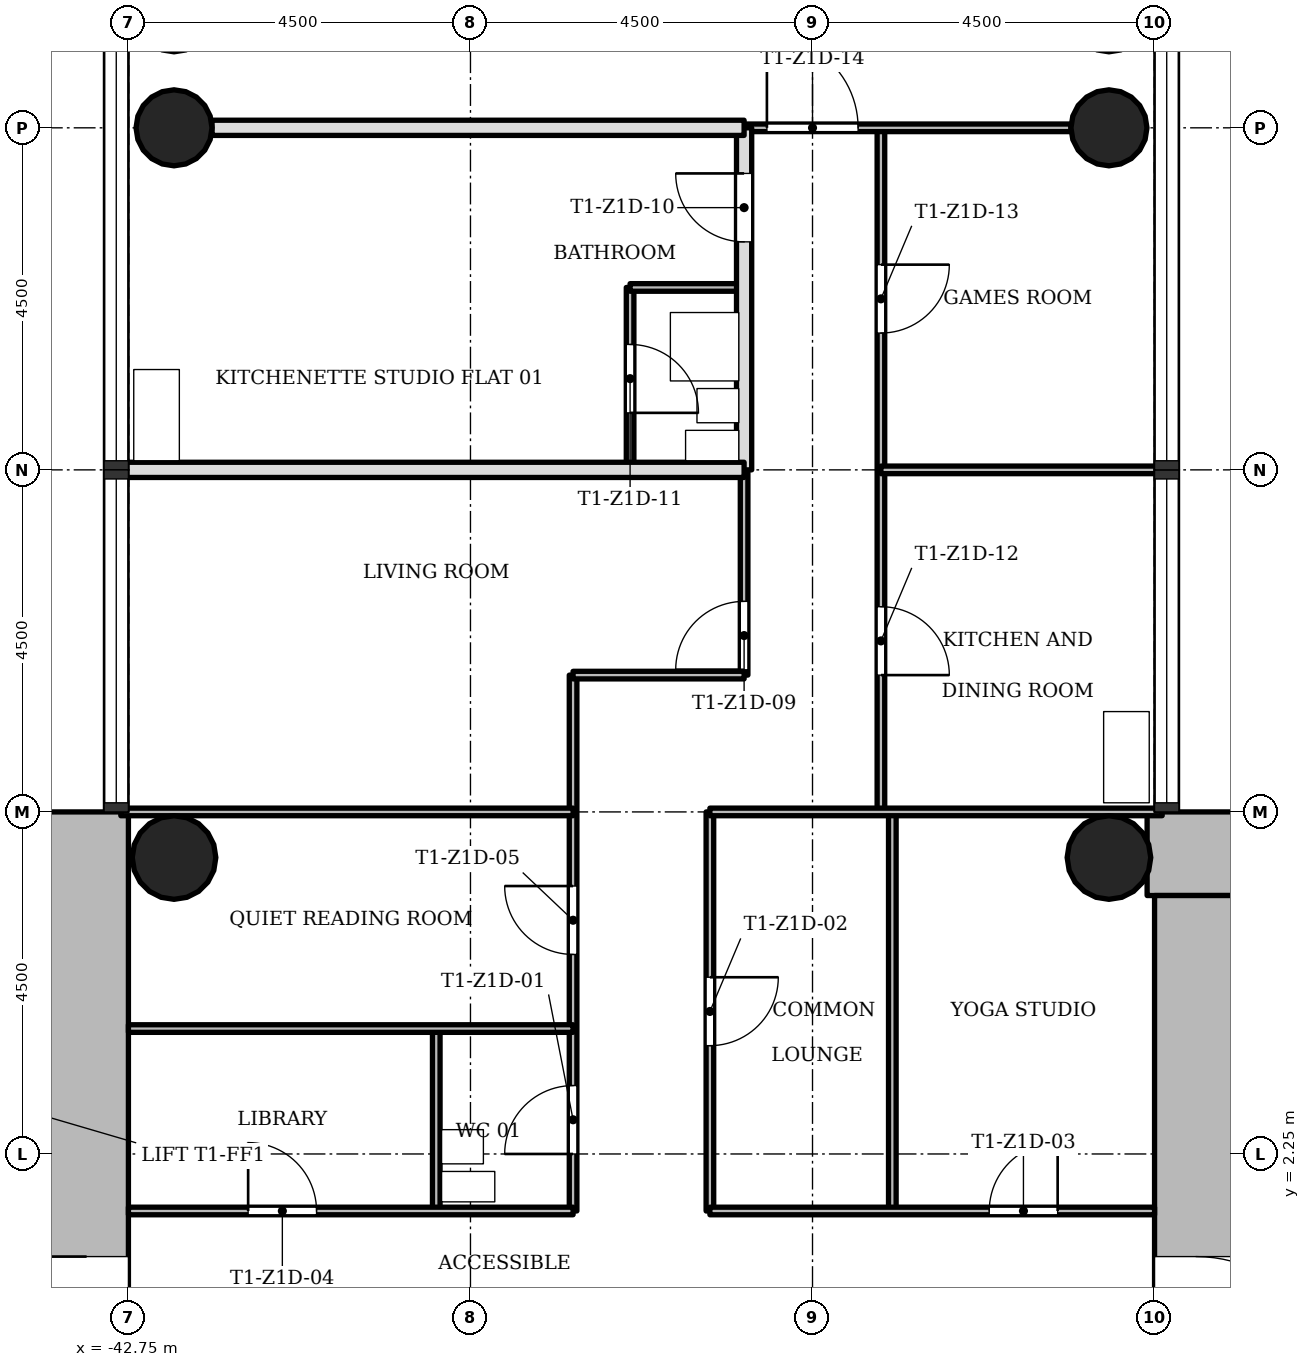
"""IFC4 building model, lengths in metres.
Left out: names, types, materials, properties, quantities, classifications, styles, units other than length and angle.
Written with IfcOpenShell. Run it as: python <this file> out.ifc"""

import sys

from ifc_helpers import new_model, si_unit, direction, frame, frame_2d, origin, origin_2d, place, context, subcontext, project, spatial, rectangle, hollow_circle, extrude, element, fill, save


model = new_model("IFC4")
c1 = context("Model", 3, precision=1e-05, world=origin(), true_north=direction((0.0, 1.0)))
c2 = subcontext(c1, "Body", "Model", "MODEL_VIEW")
j1 = project(units=[si_unit("LENGTHUNIT", "METRE"), si_unit("PLANEANGLEUNIT", "RADIAN")], contexts=[c1])
p1 = place(None, origin())
s1 = spatial("IfcSite", under=j1, at=p1, CompositionType="ELEMENT")
p2 = place(p1, origin())
s2 = spatial("IfcBuilding", under=s1, at=p2, CompositionType="ELEMENT")
p3 = place(p2, frame((0.0, 0.0, 55.1)))
s3 = spatial("IfcBuildingStorey", under=s2, at=p3, CompositionType="ELEMENT", Elevation=55.1)
p4 = place(p3, frame((-21.35, 6.2, 0.0), z_axis=(0.0, 0.0, 1.0), x_axis=(-1.0, 0.0, 0.0)))
e1 = element("IfcWall", 1, at=p4, inside=s3, PredefinedType="SHEAR", context=c2, shape_type="SweptSolid", body=[
    extrude(rectangle(XDim=7.998, YDim=1.1, at=frame_2d((3.999, 0.0))), origin(), (0.0, 0.0, 1.0), 3.4),
])
p5 = place(p3, frame((-28.7, 5.65, 0.0), z_axis=(0.0, 0.0, 1.0), x_axis=(0.0, -1.0, 0.0)))
e2 = element("IfcWall", 2, at=p5, inside=s3, PredefinedType="SHEAR", context=c2, shape_type="SweptSolid", body=[
    extrude(rectangle(XDim=12.4, YDim=1.1, at=frame_2d((6.2, 0.0))), origin(), (0.0, 0.0, 1.0), 3.4),
])
p6 = place(p5, frame((4.75, 0.0, 0.0)))
e3 = element("IfcOpeningElement", 3, at=p6, cuts=e2, PredefinedType="OPENING", context=c2, shape_type="SweptSolid", body=[
    extrude(rectangle(XDim=1.8, YDim=2.1, at=frame_2d((0.9, 1.05))), frame((0.0, 0.56, 0.0), z_axis=(0.0, -1.0, 0.0), x_axis=(1.0, 0.0, 0.0)), (0.0, 0.0, 1.0), 1.12),
])
p7 = place(p3, frame((-43.3, -5.65, 0.0), z_axis=(0.0, 0.0, 1.0), x_axis=(0.0, 1.0, 0.0)))
e4 = element("IfcWall", 4, at=p7, inside=s3, PredefinedType="SHEAR", context=c2, shape_type="SweptSolid", body=[
    extrude(rectangle(XDim=12.4, YDim=1.1, at=frame_2d((6.2, 0.0))), origin(), (0.0, 0.0, 1.0), 3.4),
])
p8 = place(p7, frame((4.75, 0.0, 0.0)))
e5 = element("IfcOpeningElement", 5, at=p8, cuts=e4, PredefinedType="OPENING", context=c2, shape_type="SweptSolid", body=[
    extrude(rectangle(XDim=1.8, YDim=2.1, at=frame_2d((0.9, 1.05))), frame((0.0, 0.56, 0.0), z_axis=(0.0, -1.0, 0.0), x_axis=(1.0, 0.0, 0.0)), (0.0, 0.0, 1.0), 1.12),
])
for number, where, z_axis, x_axis in (
    (6, (-29.85, 15.75, 0.0), (0.0, 0.0, 1.0), (1.0, 0.0, 0.0)),
    (7, (-42.15, 15.75, 0.0), (0.0, 0.0, 1.0), (1.0, 0.0, 0.0)),
):
    element("IfcColumn", number, at=place(p3, frame(where, z_axis=z_axis, x_axis=x_axis)), inside=s3, PredefinedType="COLUMN", context=c2, shape_type="SweptSolid", body=[
        extrude(hollow_circle(Radius=0.5, WallThickness=0.036, at=origin_2d()), origin(), (0.0, 0.0, 1.0), 3.4),
    ])
for number, where, z_axis, x_axis in (
    (8, (-29.85, 6.15, 0.0), (0.0, 0.0, 1.0), (1.0, 0.0, 0.0)),
    (9, (-42.15, 6.15, 0.0), (0.0, 0.0, 1.0), (1.0, 0.0, 0.0)),
):
    element("IfcColumn", number, at=place(p3, frame(where, z_axis=z_axis, x_axis=x_axis)), inside=s3, PredefinedType="COLUMN", context=c2, shape_type="SweptSolid", body=[
        extrude(hollow_circle(Radius=0.55, WallThickness=0.04, at=origin_2d()), origin(), (0.0, 0.0, 1.0), 3.4),
    ])
p9 = place(p3, frame((-38.7, 1.5, 0.0), z_axis=(0.0, 0.0, 1.0), x_axis=(0.0, 1.0, 0.0)))
e10 = element("IfcWall", 10, at=p9, inside=s3, PredefinedType="PARTITIONING", context=c2, shape_type="SweptSolid", body=[
    extrude(rectangle(XDim=2.4, YDim=0.1, at=frame_2d((1.2, 0.0))), origin(), (0.0, 0.0, 1.0), 3.0),
])
p10 = place(p3, frame((-36.9, 1.5, 0.0), z_axis=(0.0, 0.0, 1.0), x_axis=(0.0, 1.0, 0.0)))
e11 = element("IfcWall", 11, at=p10, inside=s3, PredefinedType="PARTITIONING", context=c2, shape_type="SweptSolid", body=[
    extrude(rectangle(XDim=7.05, YDim=0.1, at=frame_2d((3.525, 0.0))), origin(), (0.0, 0.0, 1.0), 3.0),
])
p11 = place(p10, frame((0.75, 0.0, 0.0)))
e12 = element("IfcOpeningElement", 12, at=p11, cuts=e11, PredefinedType="OPENING", context=c2, shape_type="SweptSolid", body=[
    extrude(rectangle(XDim=0.9, YDim=2.1, at=frame_2d((0.45, 1.05))), frame((0.0, 0.06, 0.0), z_axis=(0.0, -1.0, 0.0), x_axis=(1.0, 0.0, 0.0)), (0.0, 0.0, 1.0), 0.12),
])
p12 = place(p10, frame((3.375, 0.0, 0.0)))
e13 = element("IfcOpeningElement", 13, at=p12, cuts=e11, PredefinedType="OPENING", context=c2, shape_type="SweptSolid", body=[
    extrude(rectangle(XDim=0.9, YDim=2.1, at=frame_2d((0.45, 1.05))), frame((0.0, 0.06, 0.0), z_axis=(0.0, -1.0, 0.0), x_axis=(1.0, 0.0, 0.0)), (0.0, 0.0, 1.0), 0.12),
])
p13 = place(p3, frame((-36.15, 11.25, 0.0), z_axis=(0.0, 0.0, 1.0), x_axis=(0.0, 1.0, 0.0)))
e14 = element("IfcWall", 14, at=p13, inside=s3, PredefinedType="PARTITIONING", context=c2, shape_type="SweptSolid", body=[
    extrude(rectangle(XDim=2.4, YDim=0.1, at=frame_2d((1.2, 0.0))), origin(), (0.0, 0.0, 1.0), 3.0),
])
p14 = place(p13, frame((0.75, 0.0, 0.0)))
e15 = element("IfcOpeningElement", 15, at=p14, cuts=e14, PredefinedType="OPENING", context=c2, shape_type="SweptSolid", body=[
    extrude(rectangle(XDim=0.9, YDim=2.1, at=frame_2d((0.45, 1.05))), frame((0.0, 0.06, 0.0), z_axis=(0.0, -1.0, 0.0), x_axis=(1.0, 0.0, 0.0)), (0.0, 0.0, 1.0), 0.12),
])
p15 = place(p3, frame((-35.1, 1.5, 0.0), z_axis=(0.0, 0.0, 1.0), x_axis=(0.0, 1.0, 0.0)))
e16 = element("IfcWall", 16, at=p15, inside=s3, PredefinedType="PARTITIONING", context=c2, shape_type="SweptSolid", body=[
    extrude(rectangle(XDim=5.25, YDim=0.1, at=frame_2d((2.625, 0.0))), origin(), (0.0, 0.0, 1.0), 3.0),
])
p16 = place(p15, frame((2.175, 0.0, 0.0)))
e17 = element("IfcOpeningElement", 17, at=p16, cuts=e16, PredefinedType="OPENING", context=c2, shape_type="SweptSolid", body=[
    extrude(rectangle(XDim=0.9, YDim=2.1, at=frame_2d((0.45, 1.05))), frame((0.0, 0.06, 0.0), z_axis=(0.0, -1.0, 0.0), x_axis=(1.0, 0.0, 0.0)), (0.0, 0.0, 1.0), 0.12),
])
p17 = place(p3, frame((-34.65, 8.55, 0.0), z_axis=(0.0, 0.0, 1.0), x_axis=(0.0, 1.0, 0.0)))
e18 = element("IfcWall", 18, at=p17, inside=s3, PredefinedType="PARTITIONING", context=c2, shape_type="SweptSolid", body=[
    extrude(rectangle(XDim=2.7, YDim=0.1, at=frame_2d((1.35, 0.0))), origin(), (0.0, 0.0, 1.0), 3.0),
])
p18 = place(p17, frame((0.07, 0.0, 0.0)))
e19 = element("IfcOpeningElement", 19, at=p18, cuts=e18, PredefinedType="OPENING", context=c2, shape_type="SweptSolid", body=[
    extrude(rectangle(XDim=0.9, YDim=2.1, at=frame_2d((0.45, 1.05))), frame((0.0, 0.06, 0.0), z_axis=(0.0, -1.0, 0.0), x_axis=(1.0, 0.0, 0.0)), (0.0, 0.0, 1.0), 0.12),
])
p19 = place(p3, frame((-34.65, 11.25, 0.0), z_axis=(0.0, 0.0, 1.0), x_axis=(0.0, 1.0, 0.0)))
e20 = element("IfcWall", 20, at=p19, inside=s3, PredefinedType="SOLIDWALL", context=c2, shape_type="SweptSolid", body=[
    extrude(rectangle(XDim=4.5, YDim=0.2, at=frame_2d((2.25, 0.0))), origin(), (0.0, 0.0, 1.0), 3.0),
])
p20 = place(p19, frame((3.0, 0.0, 0.0)))
e21 = element("IfcOpeningElement", 21, at=p20, cuts=e20, PredefinedType="OPENING", context=c2, shape_type="SweptSolid", body=[
    extrude(rectangle(XDim=0.9, YDim=2.1, at=frame_2d((0.45, 1.05))), frame((0.0, 0.11, 0.0), z_axis=(0.0, -1.0, 0.0), x_axis=(1.0, 0.0, 0.0)), (0.0, 0.0, 1.0), 0.22),
])
p21 = place(p3, frame((-32.85, 6.75, 0.0), z_axis=(0.0, 0.0, 1.0), x_axis=(0.0, 1.0, 0.0)))
e22 = element("IfcWall", 22, at=p21, inside=s3, PredefinedType="PARTITIONING", context=c2, shape_type="SweptSolid", body=[
    extrude(rectangle(XDim=9.0, YDim=0.1, at=frame_2d((4.5, 0.0))), origin(), (0.0, 0.0, 1.0), 3.0),
])
p22 = place(p21, frame((1.8, 0.0, 0.0)))
e23 = element("IfcOpeningElement", 23, at=p22, cuts=e22, PredefinedType="OPENING", context=c2, shape_type="SweptSolid", body=[
    extrude(rectangle(XDim=0.9, YDim=2.1, at=frame_2d((0.45, 1.05))), frame((0.0, 0.06, 0.0), z_axis=(0.0, -1.0, 0.0), x_axis=(1.0, 0.0, 0.0)), (0.0, 0.0, 1.0), 0.12),
])
p23 = place(p21, frame((6.3, 0.0, 0.0)))
e24 = element("IfcOpeningElement", 24, at=p23, cuts=e22, PredefinedType="OPENING", context=c2, shape_type="SweptSolid", body=[
    extrude(rectangle(XDim=0.9, YDim=2.1, at=frame_2d((0.45, 1.05))), frame((0.0, 0.06, 0.0), z_axis=(0.0, -1.0, 0.0), x_axis=(1.0, 0.0, 0.0)), (0.0, 0.0, 1.0), 0.12),
])
p24 = place(p3, frame((-32.7, 1.5, 0.0), z_axis=(0.0, 0.0, 1.0), x_axis=(0.0, 1.0, 0.0)))
e25 = element("IfcWall", 25, at=p24, inside=s3, PredefinedType="PARTITIONING", context=c2, shape_type="SweptSolid", body=[
    extrude(rectangle(XDim=5.25, YDim=0.1, at=frame_2d((2.625, 0.0))), origin(), (0.0, 0.0, 1.0), 3.0),
])
p25 = place(p3, frame((-42.75, 1.5, 0.0), z_axis=(0.0, 0.0, 1.0), x_axis=(1.0, 0.0, 0.0)))
e26 = element("IfcWall", 26, at=p25, inside=s3, PredefinedType="PARTITIONING", context=c2, shape_type="SweptSolid", body=[
    extrude(rectangle(XDim=5.85, YDim=0.1, at=frame_2d((2.925, 0.0))), origin(), (0.0, 0.0, 1.0), 3.0),
])
p26 = place(p25, frame((1.575, 0.0, 0.0)))
e27 = element("IfcOpeningElement", 27, at=p26, cuts=e26, PredefinedType="OPENING", context=c2, shape_type="SweptSolid", body=[
    extrude(rectangle(XDim=0.9, YDim=2.1, at=frame_2d((0.45, 1.05))), frame((0.0, 0.06, 0.0), z_axis=(0.0, -1.0, 0.0), x_axis=(1.0, 0.0, 0.0)), (0.0, 0.0, 1.0), 0.12),
])
p27 = place(p3, frame((-35.1, 1.5, 0.0), z_axis=(0.0, 0.0, 1.0), x_axis=(1.0, 0.0, 0.0)))
e28 = element("IfcWall", 28, at=p27, inside=s3, PredefinedType="PARTITIONING", context=c2, shape_type="SweptSolid", body=[
    extrude(rectangle(XDim=5.85, YDim=0.1, at=frame_2d((2.925, 0.0))), origin(), (0.0, 0.0, 1.0), 3.0),
])
p28 = place(p27, frame((3.675, 0.0, 0.0)))
e29 = element("IfcOpeningElement", 29, at=p28, cuts=e28, PredefinedType="OPENING", context=c2, shape_type="SweptSolid", body=[
    extrude(rectangle(XDim=0.9, YDim=2.1, at=frame_2d((0.45, 1.05))), frame((0.0, 0.06, 0.0), z_axis=(0.0, -1.0, 0.0), x_axis=(1.0, 0.0, 0.0)), (0.0, 0.0, 1.0), 0.12),
])
p29 = place(p3, frame((-42.75, 3.9, 0.0), z_axis=(0.0, 0.0, 1.0), x_axis=(1.0, 0.0, 0.0)))
e30 = element("IfcWall", 30, at=p29, inside=s3, PredefinedType="PARTITIONING", context=c2, shape_type="SweptSolid", body=[
    extrude(rectangle(XDim=5.85, YDim=0.1, at=frame_2d((2.925, 0.0))), origin(), (0.0, 0.0, 1.0), 3.0),
])
for number, where, z_axis, x_axis in (
    (31, (-42.85, 6.75, 0.0), (0.0, 0.0, 1.0), (1.0, 0.0, 0.0)),
    (32, (-35.1, 6.75, 0.0), (0.0, 0.0, 1.0), (1.0, 0.0, 0.0)),
):
    element("IfcWall", number, at=place(p3, frame(where, z_axis=z_axis, x_axis=x_axis)), inside=s3, PredefinedType="PARTITIONING", context=c2, shape_type="SweptSolid", body=[
        extrude(rectangle(XDim=5.95, YDim=0.1, at=frame_2d((2.975, 0.0))), origin(), (0.0, 0.0, 1.0), 3.0),
    ])
p30 = place(p3, frame((-36.9, 8.55, 0.0), z_axis=(0.0, 0.0, 1.0), x_axis=(1.0, 0.0, 0.0)))
e33 = element("IfcWall", 33, at=p30, inside=s3, PredefinedType="PARTITIONING", context=c2, shape_type="SweptSolid", body=[
    extrude(rectangle(XDim=2.25, YDim=0.1, at=frame_2d((1.125, 0.0))), origin(), (0.0, 0.0, 1.0), 3.0),
])
p31 = place(p3, frame((-32.85, 11.25, 0.0), z_axis=(0.0, 0.0, 1.0), x_axis=(1.0, 0.0, 0.0)))
e34 = element("IfcWall", 34, at=p31, inside=s3, PredefinedType="PARTITIONING", context=c2, shape_type="SweptSolid", body=[
    extrude(rectangle(XDim=3.7, YDim=0.1, at=frame_2d((1.85, 0.0))), origin(), (0.0, 0.0, 1.0), 3.0),
])
p32 = place(p3, frame((-42.85, 11.25, 0.0), z_axis=(0.0, 0.0, 1.0), x_axis=(1.0, 0.0, 0.0)))
e35 = element("IfcWall", 35, at=p32, inside=s3, PredefinedType="SOLIDWALL", context=c2, shape_type="SweptSolid", body=[
    extrude(rectangle(XDim=8.2, YDim=0.2, at=frame_2d((4.1, 0.0))), origin(), (0.0, 0.0, 1.0), 3.0),
])
p33 = place(p3, frame((-36.15, 13.65, 0.0), z_axis=(0.0, 0.0, 1.0), x_axis=(1.0, 0.0, 0.0)))
e36 = element("IfcWall", 36, at=p33, inside=s3, PredefinedType="PARTITIONING", context=c2, shape_type="SweptSolid", body=[
    extrude(rectangle(XDim=1.5, YDim=0.1, at=frame_2d((0.75, 0.0))), origin(), (0.0, 0.0, 1.0), 3.0),
])
p34 = place(p3, frame((-34.65, 15.75, 0.0), z_axis=(0.0, 0.0, 1.0), x_axis=(1.0, 0.0, 0.0)))
e37 = element("IfcWall", 37, at=p34, inside=s3, PredefinedType="PARTITIONING", context=c2, shape_type="SweptSolid", body=[
    extrude(rectangle(XDim=4.3, YDim=0.1, at=frame_2d((2.15, 0.0))), origin(), (0.0, 0.0, 1.0), 3.0),
])
p35 = place(p34, frame((0.3, 0.0, 0.0)))
e38 = element("IfcOpeningElement", 38, at=p35, cuts=e37, PredefinedType="OPENING", context=c2, shape_type="SweptSolid", body=[
    extrude(rectangle(XDim=1.2, YDim=2.1, at=frame_2d((0.6, 1.05))), frame((0.0, 0.06, 0.0), z_axis=(0.0, -1.0, 0.0), x_axis=(1.0, 0.0, 0.0)), (0.0, 0.0, 1.0), 0.12),
])
p36 = place(p3, frame((-41.65, 15.75, 0.0), z_axis=(0.0, 0.0, 1.0), x_axis=(1.0, 0.0, 0.0)))
e39 = element("IfcWall", 39, at=p36, inside=s3, PredefinedType="SOLIDWALL", context=c2, shape_type="SweptSolid", body=[
    extrude(rectangle(XDim=7.0, YDim=0.2, at=frame_2d((3.5, 0.0))), origin(), (0.0, 0.0, 1.0), 3.0),
])
p37 = place(p11, origin())
e40 = element("IfcDoor", 40, at=p37, inside=s3, OperationType="SINGLE_SWING_RIGHT", PredefinedType="DOOR", context=c2, shape_type="SweptSolid", body=[
    extrude(rectangle(XDim=0.9, YDim=2.1, at=frame_2d((0.45, 1.05))), frame((0.0, 0.025, 0.0), z_axis=(0.0, -1.0, 0.0), x_axis=(1.0, 0.0, 0.0)), (0.0, 0.0, 1.0), 0.05),
])
fill(e12, e40)
p38 = place(p16, origin())
e41 = element("IfcDoor", 41, at=p38, inside=s3, OperationType="SINGLE_SWING_RIGHT", PredefinedType="DOOR", context=c2, shape_type="SweptSolid", body=[
    extrude(rectangle(XDim=0.9, YDim=2.1, at=frame_2d((0.45, 1.05))), frame((0.0, 0.025, 0.0), z_axis=(0.0, -1.0, 0.0), x_axis=(1.0, 0.0, 0.0)), (0.0, 0.0, 1.0), 0.05),
])
fill(e17, e41)
p39 = place(p28, origin())
e42 = element("IfcDoor", 42, at=p39, inside=s3, OperationType="SINGLE_SWING_LEFT", PredefinedType="DOOR", context=c2, shape_type="SweptSolid", body=[
    extrude(rectangle(XDim=0.9, YDim=2.1, at=frame_2d((0.45, 1.05))), frame((0.0, 0.025, 0.0), z_axis=(0.0, -1.0, 0.0), x_axis=(1.0, 0.0, 0.0)), (0.0, 0.0, 1.0), 0.05),
])
fill(e29, e42)
p40 = place(p26, origin())
e43 = element("IfcDoor", 43, at=p40, inside=s3, OperationType="SINGLE_SWING_RIGHT", PredefinedType="DOOR", context=c2, shape_type="SweptSolid", body=[
    extrude(rectangle(XDim=0.9, YDim=2.1, at=frame_2d((0.45, 1.05))), frame((0.0, 0.025, 0.0), z_axis=(0.0, -1.0, 0.0), x_axis=(1.0, 0.0, 0.0)), (0.0, 0.0, 1.0), 0.05),
])
fill(e27, e43)
p41 = place(p12, origin())
e44 = element("IfcDoor", 44, at=p41, inside=s3, OperationType="SINGLE_SWING_LEFT", PredefinedType="DOOR", context=c2, shape_type="SweptSolid", body=[
    extrude(rectangle(XDim=0.9, YDim=2.1, at=frame_2d((0.45, 1.05))), frame((0.0, 0.025, 0.0), z_axis=(0.0, -1.0, 0.0), x_axis=(1.0, 0.0, 0.0)), (0.0, 0.0, 1.0), 0.05),
])
fill(e13, e44)
p42 = place(p18, origin())
e45 = element("IfcDoor", 45, at=p42, inside=s3, OperationType="SINGLE_SWING_RIGHT", PredefinedType="DOOR", context=c2, shape_type="SweptSolid", body=[
    extrude(rectangle(XDim=0.9, YDim=2.1, at=frame_2d((0.45, 1.05))), frame((0.0, 0.025, 0.0), z_axis=(0.0, -1.0, 0.0), x_axis=(1.0, 0.0, 0.0)), (0.0, 0.0, 1.0), 0.05),
])
fill(e19, e45)
p43 = place(p20, origin())
e46 = element("IfcDoor", 46, at=p43, inside=s3, OperationType="SINGLE_SWING_LEFT", PredefinedType="DOOR", context=c2, shape_type="SweptSolid", body=[
    extrude(rectangle(XDim=0.9, YDim=2.1, at=frame_2d((0.45, 1.05))), frame((0.0, 0.025, 0.0), z_axis=(0.0, -1.0, 0.0), x_axis=(1.0, 0.0, 0.0)), (0.0, 0.0, 1.0), 0.05),
])
fill(e21, e46)
p44 = place(p14, origin())
e47 = element("IfcDoor", 47, at=p44, inside=s3, OperationType="SINGLE_SWING_LEFT", PredefinedType="DOOR", context=c2, shape_type="SweptSolid", body=[
    extrude(rectangle(XDim=0.9, YDim=2.1, at=frame_2d((0.45, 1.05))), frame((0.0, 0.025, 0.0), z_axis=(0.0, -1.0, 0.0), x_axis=(1.0, 0.0, 0.0)), (0.0, 0.0, 1.0), 0.05),
])
fill(e15, e47)
p45 = place(p22, origin())
e48 = element("IfcDoor", 48, at=p45, inside=s3, OperationType="SINGLE_SWING_LEFT", PredefinedType="DOOR", context=c2, shape_type="SweptSolid", body=[
    extrude(rectangle(XDim=0.9, YDim=2.1, at=frame_2d((0.45, 1.05))), frame((0.0, 0.025, 0.0), z_axis=(0.0, -1.0, 0.0), x_axis=(1.0, 0.0, 0.0)), (0.0, 0.0, 1.0), 0.05),
])
fill(e23, e48)
p46 = place(p23, origin())
e49 = element("IfcDoor", 49, at=p46, inside=s3, OperationType="SINGLE_SWING_RIGHT", PredefinedType="DOOR", context=c2, shape_type="SweptSolid", body=[
    extrude(rectangle(XDim=0.9, YDim=2.1, at=frame_2d((0.45, 1.05))), frame((0.0, 0.025, 0.0), z_axis=(0.0, -1.0, 0.0), x_axis=(1.0, 0.0, 0.0)), (0.0, 0.0, 1.0), 0.05),
])
fill(e24, e49)
p47 = place(p35, origin())
e50 = element("IfcDoor", 50, at=p47, inside=s3, OperationType="SINGLE_SWING_RIGHT", PredefinedType="DOOR", context=c2, shape_type="SweptSolid", body=[
    extrude(rectangle(XDim=1.2, YDim=2.1, at=frame_2d((0.6, 1.05))), frame((0.0, 0.025, 0.0), z_axis=(0.0, -1.0, 0.0), x_axis=(1.0, 0.0, 0.0)), (0.0, 0.0, 1.0), 0.05),
])
fill(e38, e50)
p48 = place(p6, origin())
e51 = element("IfcDoor", 51, at=p48, inside=s3, OperationType="SINGLE_SWING_LEFT", PredefinedType="DOOR", context=c2, shape_type="SweptSolid", body=[
    extrude(rectangle(XDim=1.8, YDim=2.1, at=frame_2d((0.9, 1.05))), frame((0.0, 0.025, 0.0), z_axis=(0.0, -1.0, 0.0), x_axis=(1.0, 0.0, 0.0)), (0.0, 0.0, 1.0), 0.05),
])
fill(e3, e51)
p49 = place(p8, origin())
e52 = element("IfcDoor", 52, at=p49, inside=s3, OperationType="SINGLE_SWING_LEFT", PredefinedType="DOOR", context=c2, shape_type="SweptSolid", body=[
    extrude(rectangle(XDim=1.8, YDim=2.1, at=frame_2d((0.9, 1.05))), frame((0.0, 0.025, 0.0), z_axis=(0.0, -1.0, 0.0), x_axis=(1.0, 0.0, 0.0)), (0.0, 0.0, 1.0), 0.05),
])
fill(e5, e52)
save(model, sys.argv[1])
